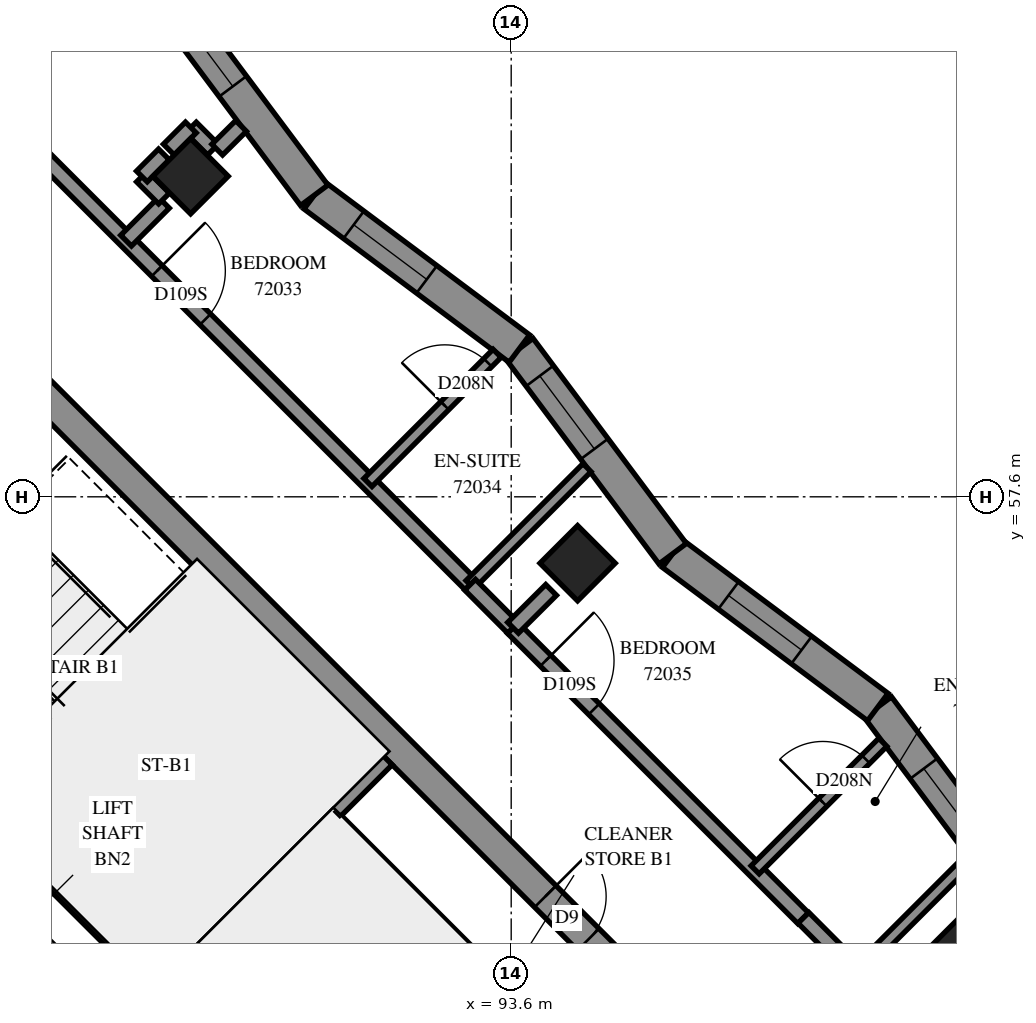
"""IFC4 building model, lengths in metres.
Left out: names, types, materials, properties, quantities, classifications, styles, units other than length and angle.
Written with IfcOpenShell. Run it as: python <this file> out.ifc"""

import sys

from ifc_helpers import new_model, si_unit, direction, frame, frame_2d, origin, origin_2d, place, context, subcontext, project, spatial, polyline, rectangle, outline, extrude, element, fill, save


model = new_model("IFC4")
c1 = context("Model", 3, precision=1e-05, world=origin(), true_north=direction((0.0, 1.0)))
c2 = subcontext(c1, "Body", "Model", "MODEL_VIEW")
j1 = project(units=[si_unit("LENGTHUNIT", "METRE"), si_unit("PLANEANGLEUNIT", "RADIAN")], contexts=[c1])
p1 = place(None, origin())
s1 = spatial("IfcSite", under=j1, at=p1, CompositionType="ELEMENT")
p2 = place(p1, origin())
s2 = spatial("IfcBuilding", under=s1, at=p2, CompositionType="ELEMENT")
p3 = place(p2, frame((0.0, 0.0, 264.2)))
s3 = spatial("IfcBuildingStorey", under=s2, at=p3, CompositionType="ELEMENT", Elevation=264.2)
for number, where, z_axis, x_axis in (
    (1, (89.382, 61.818, 0.0), (0.0, 0.0, 1.0), (0.707, -0.707, 0.0)),
    (2, (94.474, 56.727, 0.0), (0.0, 0.0, 1.0), (0.707, -0.707, 0.0)),
    (3, (99.565, 51.635, 0.0), (0.0, 0.0, 1.0), (0.707, -0.707, 0.0)),
):
    element("IfcColumn", number, at=place(p3, frame(where, z_axis=z_axis, x_axis=x_axis)), inside=s3, PredefinedType="COLUMN", context=c2, shape_type="SweptSolid", body=[
        extrude(rectangle(XDim=0.7, YDim=0.7, at=origin_2d()), origin(), (0.0, 0.0, 1.0), 3.1),
    ])
p4 = place(p3, frame((86.695, 59.696, -0.3), z_axis=(0.0, 0.0, 1.0), x_axis=(0.7071100706, -0.7071034917, 0.0)))
e4 = element("IfcWall", 4, at=p4, inside=s3, PredefinedType="SHEAR", context=c2, shape_type="SweptSolid", body=[
    extrude(rectangle(XDim=15.2, YDim=0.4, at=frame_2d((7.6, 0.0))), origin(), (0.0, 0.0, 1.0), 2.7),
])
p5 = place(p4, frame((10.4, 0.0, 0.3)))
e5 = element("IfcOpeningElement", 5, at=p5, cuts=e4, PredefinedType="OPENING", context=c2, shape_type="SweptSolid", body=[
    extrude(rectangle(XDim=0.8, YDim=2.1, at=frame_2d((0.4, 1.05))), frame((0.0, 0.21, 0.0), z_axis=(0.0, -1.0, 0.0), x_axis=(1.0, 0.0, 0.0)), (0.0, 0.0, 1.0), 0.42),
])
p6 = place(p3, frame((81.534, 53.969, 0.0), z_axis=(0.0, 0.0, 1.0), x_axis=(0.707103309, -0.7071102534, 0.0)))
e6 = element("IfcWall", 6, at=p6, inside=s3, PredefinedType="SOLIDWALL", context=c2, shape_type="SweptSolid", body=[
    extrude(rectangle(XDim=14.4, YDim=0.3, at=frame_2d((7.2, 0.0))), origin(), (0.0, 0.0, 1.0), 3.1),
])
p7 = place(p6, frame((8.55, 0.0, 0.0)))
e7 = element("IfcOpeningElement", 7, at=p7, cuts=e6, PredefinedType="OPENING", context=c2, shape_type="SweptSolid", body=[
    extrude(rectangle(XDim=0.9, YDim=2.1, at=frame_2d((0.45, 1.05))), frame((0.0, 0.16, 0.0), z_axis=(0.0, -1.0, 0.0), x_axis=(1.0, 0.0, 0.0)), (0.0, 0.0, 1.0), 0.32),
])
p8 = place(p6, frame((1.25, 0.0, 0.0)))
e8 = element("IfcOpeningElement", 8, at=p8, cuts=e6, PredefinedType="OPENING", context=c2, shape_type="SweptSolid", body=[
    extrude(rectangle(XDim=1.1, YDim=2.1, at=frame_2d((0.55, 1.05))), frame((0.0, 0.16, 0.0), z_axis=(0.0, -1.0, 0.0), x_axis=(1.0, 0.0, 0.0)), (0.0, 0.0, 1.0), 0.32),
])
p9 = place(p6, frame((4.85, 0.0, 0.0)))
e9 = element("IfcOpeningElement", 9, at=p9, cuts=e6, PredefinedType="OPENING", context=c2, shape_type="SweptSolid", body=[
    extrude(rectangle(XDim=1.1, YDim=2.1, at=frame_2d((0.55, 1.05))), frame((0.0, 0.16, 0.0), z_axis=(0.0, -1.0, 0.0), x_axis=(1.0, 0.0, 0.0)), (0.0, 0.0, 1.0), 0.32),
])
p10 = place(p6, frame((12.05, 0.0, 0.0)))
e10 = element("IfcOpeningElement", 10, at=p10, cuts=e6, PredefinedType="OPENING", context=c2, shape_type="SweptSolid", body=[
    extrude(rectangle(XDim=1.1, YDim=2.1, at=frame_2d((0.55, 1.05))), frame((0.0, 0.16, 0.0), z_axis=(0.0, -1.0, 0.0), x_axis=(1.0, 0.0, 0.0)), (0.0, 0.0, 1.0), 0.32),
])
p11 = place(p3, frame((83.867, 56.302, 0.0), z_axis=(0.0, 0.0, 1.0), x_axis=(0.7071137256, -0.7070998367, 0.0)))
e11 = element("IfcWall", 11, at=p11, inside=s3, PredefinedType="SOLIDWALL", context=c2, shape_type="SweptSolid", body=[
    extrude(rectangle(XDim=7.2, YDim=0.3, at=frame_2d((3.6, 0.0))), origin(), (0.0, 0.0, 1.0), 3.1),
])
p12 = place(p3, frame((88.958, 51.211, 0.0), z_axis=(0.0, 0.0, 1.0), x_axis=(0.7071067812, 0.7071067812, 0.0)))
e12 = element("IfcWall", 12, at=p12, inside=s3, PredefinedType="SOLIDWALL", context=c2, shape_type="SweptSolid", body=[
    extrude(rectangle(XDim=4.2, YDim=0.3, at=frame_2d((2.1, 0.0))), origin(), (0.0, 0.0, 1.0), 3.1),
])
p13 = place(p3, frame((100.452, 52.12, 0.0), z_axis=(0.0, 0.0, 1.0), x_axis=(-0.5986678127, 0.8009974095, 0.0)))
e13 = element("IfcWall", 13, at=p13, inside=s3, PredefinedType="SOLIDWALL", context=c2, shape_type="SweptSolid", body=[
    extrude(outline(polyline([(0.052, -0.225), (3.421, -0.225), (3.357, 0.225), (-0.052, 0.225), (0.052, -0.225)])), origin(), (0.0, 0.0, 1.0), 3.1),
])
p14 = place(p13, frame((1.178, 0.0, 0.45)))
e14 = element("IfcOpeningElement", 14, at=p14, cuts=e13, PredefinedType="OPENING", context=c2, shape_type="SweptSolid", body=[
    extrude(rectangle(XDim=1.2, YDim=2.55, at=frame_2d((0.6, 1.275))), frame((0.0, 0.235, 0.0), z_axis=(0.0, -1.0, 0.0), x_axis=(1.0, 0.0, 0.0)), (0.0, 0.0, 1.0), 0.47),
])
p15 = place(p3, frame((98.423, 54.834, 0.0), z_axis=(0.0, 0.0, 1.0), x_axis=(-0.8009997286, 0.5986647099, 0.0)))
e15 = element("IfcWall", 15, at=p15, inside=s3, PredefinedType="SOLIDWALL", context=c2, shape_type="SweptSolid", body=[
    extrude(outline(polyline([(-0.033, -0.225), (3.337, -0.225), (3.402, 0.225), (0.033, 0.225), (-0.033, -0.225)])), origin(), (0.0, 0.0, 1.0), 3.1),
])
p16 = place(p15, frame((1.253, 0.0, 0.45)))
e16 = element("IfcOpeningElement", 16, at=p16, cuts=e15, PredefinedType="OPENING", context=c2, shape_type="SweptSolid", body=[
    extrude(rectangle(XDim=1.2, YDim=2.55, at=frame_2d((0.6, 1.275))), frame((0.0, 0.235, 0.0), z_axis=(0.0, -1.0, 0.0), x_axis=(1.0, 0.0, 0.0)), (0.0, 0.0, 1.0), 0.47),
])
p17 = place(p3, frame((95.725, 56.851, 0.0), z_axis=(0.0, 0.0, 1.0), x_axis=(-0.5986837527, 0.8009854957, 0.0)))
e17 = element("IfcWall", 17, at=p17, inside=s3, PredefinedType="SOLIDWALL", context=c2, shape_type="SweptSolid", body=[
    extrude(outline(polyline([(0.033, -0.225), (3.402, -0.225), (3.337, 0.225), (-0.033, 0.225), (0.033, -0.225)])), origin(), (0.0, 0.0, 1.0), 3.1),
])
p18 = place(p17, frame((1.721, 0.0, 0.45)))
e18 = element("IfcOpeningElement", 18, at=p18, cuts=e17, PredefinedType="OPENING", context=c2, shape_type="SweptSolid", body=[
    extrude(rectangle(XDim=1.2, YDim=2.55, at=frame_2d((0.6, 1.275))), frame((0.0, 0.235, 0.0), z_axis=(0.0, -1.0, 0.0), x_axis=(1.0, 0.0, 0.0)), (0.0, 0.0, 1.0), 0.47),
])
p19 = place(p3, frame((93.707, 59.55, 0.0), z_axis=(0.0, 0.0, 1.0), x_axis=(-0.8009854957, 0.5986837527, 0.0)))
e19 = element("IfcWall", 19, at=p19, inside=s3, PredefinedType="SOLIDWALL", context=c2, shape_type="SweptSolid", body=[
    extrude(outline(polyline([(-0.033, -0.225), (3.337, -0.225), (3.402, 0.225), (0.033, 0.225), (-0.033, -0.225)])), origin(), (0.0, 0.0, 1.0), 3.1),
])
p20 = place(p19, frame((1.521, 0.0, 0.45)))
e20 = element("IfcOpeningElement", 20, at=p20, cuts=e19, PredefinedType="OPENING", context=c2, shape_type="SweptSolid", body=[
    extrude(rectangle(XDim=1.2, YDim=2.55, at=frame_2d((0.6, 1.275))), frame((0.0, 0.235, 0.0), z_axis=(0.0, -1.0, 0.0), x_axis=(1.0, 0.0, 0.0)), (0.0, 0.0, 1.0), 0.47),
])
p21 = place(p3, frame((91.009, 61.567, 0.0), z_axis=(0.0, 0.0, 1.0), x_axis=(-0.598678943, 0.8009890906, 0.0)))
e21 = element("IfcWall", 21, at=p21, inside=s3, PredefinedType="SOLIDWALL", context=c2, shape_type="SweptSolid", body=[
    extrude(outline(polyline([(0.033, -0.225), (3.402, -0.225), (3.337, 0.225), (-0.033, 0.225), (0.033, -0.225)])), origin(), (0.0, 0.0, 1.0), 3.1),
])
p22 = place(p21, frame((1.789, 0.0, 0.45)))
e22 = element("IfcOpeningElement", 22, at=p22, cuts=e21, PredefinedType="OPENING", context=c2, shape_type="SweptSolid", body=[
    extrude(rectangle(XDim=1.2, YDim=2.55, at=frame_2d((0.6, 1.275))), frame((0.0, 0.235, 0.0), z_axis=(0.0, -1.0, 0.0), x_axis=(1.0, 0.0, 0.0)), (0.0, 0.0, 1.0), 0.47),
])
p23 = place(p3, frame((91.313, 53.354, 0.0), z_axis=(0.0, 0.0, 1.0), x_axis=(0.7071067812, -0.7071067812, 0.0)))
e23 = element("IfcWall", 23, at=p23, inside=s3, PredefinedType="PARTITIONING", context=c2, shape_type="SweptSolid", body=[
    extrude(rectangle(XDim=5.95, YDim=0.15, at=frame_2d((2.975, 0.0))), origin(), (0.0, 0.0, 1.0), 3.1),
])
p24 = place(p3, frame((86.841, 62.669, 0.0), z_axis=(0.0, 0.0, 1.0), x_axis=(0.7071067812, -0.7071067812, 0.0)))
e24 = element("IfcWall", 24, at=p24, inside=s3, PredefinedType="PARTITIONING", context=c2, shape_type="SweptSolid", body=[
    extrude(rectangle(XDim=8.799, YDim=0.2, at=frame_2d((4.4, 0.0))), origin(), (0.0, 0.0, 1.0), 3.1),
])
p25 = place(p24, frame((2.967, 0.0, 0.0)))
e25 = element("IfcOpeningElement", 25, at=p25, cuts=e24, PredefinedType="OPENING", context=c2, shape_type="SweptSolid", body=[
    extrude(rectangle(XDim=0.9, YDim=2.1, at=frame_2d((0.45, 1.05))), frame((0.0, 0.11, 0.0), z_axis=(0.0, -1.0, 0.0), x_axis=(1.0, 0.0, 0.0)), (0.0, 0.0, 1.0), 0.22),
])
p26 = place(p3, frame((93.621, 55.875, 0.0), z_axis=(0.0, 0.0, 1.0), x_axis=(0.7071623255, -0.7070512325, 0.0)))
e26 = element("IfcWall", 26, at=p26, inside=s3, PredefinedType="PARTITIONING", context=c2, shape_type="SweptSolid", body=[
    extrude(rectangle(XDim=5.401, YDim=0.2, at=frame_2d((2.7, 0.0))), origin(), (0.0, 0.0, 1.0), 3.1),
])
p27 = place(p26, frame((0.611, 0.0, 0.0)))
e27 = element("IfcOpeningElement", 27, at=p27, cuts=e26, PredefinedType="OPENING", context=c2, shape_type="SweptSolid", body=[
    extrude(rectangle(XDim=0.9, YDim=2.1, at=frame_2d((0.45, 1.05))), frame((0.0, 0.11, 0.0), z_axis=(0.0, -1.0, 0.0), x_axis=(1.0, 0.0, 0.0)), (0.0, 0.0, 1.0), 0.22),
])
p28 = place(p3, frame((91.716, 57.788, 0.0), z_axis=(0.0, 0.0, 1.0), x_axis=(0.7071067812, 0.7071067812, 0.0)))
e28 = element("IfcWall", 28, at=p28, inside=s3, PredefinedType="PARTITIONING", context=c2, shape_type="SweptSolid", body=[
    extrude(rectangle(XDim=2.403, YDim=0.15, at=frame_2d((1.202, 0.0))), origin(), (0.0, 0.0, 1.0), 3.1),
])
p29 = place(p28, frame((1.43, 0.0, 0.0)))
e29 = element("IfcOpeningElement", 29, at=p29, cuts=e28, PredefinedType="OPENING", context=c2, shape_type="SweptSolid", body=[
    extrude(rectangle(XDim=0.8, YDim=2.1, at=frame_2d((0.4, 1.05))), frame((0.0, 0.085, 0.0), z_axis=(0.0, -1.0, 0.0), x_axis=(1.0, 0.0, 0.0)), (0.0, 0.0, 1.0), 0.17),
])
p30 = place(p3, frame((96.809, 52.693, 0.0), z_axis=(0.0, 0.0, 1.0), x_axis=(0.7075279036, 0.7066854079, 0.0)))
e30 = element("IfcWall", 30, at=p30, inside=s3, PredefinedType="PARTITIONING", context=c2, shape_type="SweptSolid", body=[
    extrude(rectangle(XDim=2.374, YDim=0.15, at=frame_2d((1.187, 0.0))), origin(), (0.0, 0.0, 1.0), 3.1),
])
p31 = place(p30, frame((1.258, 0.0, 0.0)))
e31 = element("IfcOpeningElement", 31, at=p31, cuts=e30, PredefinedType="OPENING", context=c2, shape_type="SweptSolid", body=[
    extrude(rectangle(XDim=0.8, YDim=2.1, at=frame_2d((0.4, 1.05))), frame((0.0, 0.085, 0.0), z_axis=(0.0, -1.0, 0.0), x_axis=(1.0, 0.0, 0.0)), (0.0, 0.0, 1.0), 0.17),
])
p32 = place(p3, frame((93.059, 56.445, 0.0), z_axis=(0.0, 0.0, 1.0), x_axis=(0.7071067812, 0.7071067812, 0.0)))
e32 = element("IfcWall", 32, at=p32, inside=s3, PredefinedType="PARTITIONING", context=c2, shape_type="SweptSolid", body=[
    extrude(rectangle(XDim=2.175, YDim=0.15, at=frame_2d((1.088, 0.0))), origin(), (0.0, 0.0, 1.0), 3.1),
])
p33 = place(p3, frame((98.149, 51.353, 0.0), z_axis=(0.0, 0.0, 1.0), x_axis=(0.7070829733, 0.7071305883, 0.0)))
e33 = element("IfcWall", 33, at=p33, inside=s3, PredefinedType="PARTITIONING", context=c2, shape_type="SweptSolid", body=[
    extrude(rectangle(XDim=2.1, YDim=0.15, at=frame_2d((1.05, 0.0))), origin(), (0.0, 0.0, 1.0), 3.1),
])
p34 = place(p3, frame((97.445, 52.061, 0.0), z_axis=(0.0, 0.0, 1.0), x_axis=(0.7059292536, -0.7082823511, 0.0)))
e34 = element("IfcWall", 34, at=p34, inside=s3, PredefinedType="PARTITIONING", context=c2, shape_type="SweptSolid", body=[
    extrude(rectangle(XDim=0.85, YDim=0.2, at=frame_2d((0.425, 0.0))), origin(), (0.0, 0.0, 1.0), 3.1),
])
p35 = place(p3, frame((93.059, 56.443, 0.0), z_axis=(0.0, 0.0, 1.0), x_axis=(0.7058541592, -0.7083571881, 0.0)))
e35 = element("IfcWall", 35, at=p35, inside=s3, PredefinedType="PARTITIONING", context=c2, shape_type="SweptSolid", body=[
    extrude(rectangle(XDim=0.799, YDim=0.2, at=frame_2d((0.4, 0.0))), origin(), (0.0, 0.0, 1.0), 3.1),
])
p36 = place(p3, frame((93.625, 55.877, 0.0), z_axis=(0.0, 0.0, 1.0), x_axis=(0.7085224061, 0.7056883165, 0.0)))
e36 = element("IfcWall", 36, at=p36, inside=s3, PredefinedType="PARTITIONING", context=c2, shape_type="SweptSolid", body=[
    extrude(rectangle(XDim=0.706, YDim=0.2, at=frame_2d((0.353, 0.0))), origin(), (0.0, 0.0, 1.0), 3.1),
])
p37 = place(p3, frame((88.534, 60.971, 0.0), z_axis=(0.0, 0.0, 1.0), x_axis=(0.7071067812, 0.7071067812, 0.0)))
e37 = element("IfcWall", 37, at=p37, inside=s3, PredefinedType="PARTITIONING", context=c2, shape_type="SweptSolid", body=[
    extrude(rectangle(XDim=0.704, YDim=0.2, at=frame_2d((0.352, 0.0))), origin(), (0.0, 0.0, 1.0), 3.1),
])
for number, where, z_axis, x_axis in (
    (38, (88.743, 61.815, 0.0), (0.0, 0.0, 1.0), (0.707, -0.707, 0.0)),
    (39, (89.386, 62.458, 0.0), (0.0, 0.0, 1.0), (0.707, -0.707, 0.0)),
    (40, (88.741, 61.815, 0.0), (0.0, 0.0, 1.0), (0.707, 0.707, 0.0)),
    (41, (89.095, 62.169, 0.0), (0.0, 0.0, 1.0), (0.707, 0.707, 0.0)),
):
    element("IfcWall", number, at=place(p3, frame(where, z_axis=z_axis, x_axis=x_axis)), inside=s3, PredefinedType="PARTITIONING", context=c2, shape_type="SweptSolid", body=[
        extrude(rectangle(XDim=0.41, YDim=0.2, at=frame_2d((0.205, 0.0))), origin(), (0.0, 0.0, 1.0), 3.1),
    ])
p38 = place(p3, frame((89.733, 62.167, 0.0), z_axis=(0.0, 0.0, 1.0), x_axis=(0.7098168379, 0.7043862979, 0.0)))
e42 = element("IfcWall", 42, at=p38, inside=s3, PredefinedType="PARTITIONING", context=c2, shape_type="SweptSolid", body=[
    extrude(rectangle(XDim=0.442, YDim=0.2, at=frame_2d((0.221, 0.0))), origin(), (0.0, 0.0, 1.0), 3.1),
])
p39 = place(p14, origin())
e43 = element("IfcWindow", 43, at=p39, inside=s3, PartitioningType="SINGLE_PANEL", PredefinedType="WINDOW", context=c2, shape_type="SweptSolid", body=[
    extrude(rectangle(XDim=1.2, YDim=2.55, at=frame_2d((0.6, 1.275))), frame((0.0, 0.205, 0.0), z_axis=(0.0, -1.0, 0.0), x_axis=(1.0, 0.0, 0.0)), (0.0, 0.0, 1.0), 0.06),
])
fill(e14, e43)
p40 = place(p16, origin())
e44 = element("IfcWindow", 44, at=p40, inside=s3, PartitioningType="SINGLE_PANEL", PredefinedType="WINDOW", context=c2, shape_type="SweptSolid", body=[
    extrude(rectangle(XDim=1.2, YDim=2.55, at=frame_2d((0.6, 1.275))), frame((0.0, 0.205, 0.0), z_axis=(0.0, -1.0, 0.0), x_axis=(1.0, 0.0, 0.0)), (0.0, 0.0, 1.0), 0.06),
])
fill(e16, e44)
p41 = place(p18, origin())
e45 = element("IfcWindow", 45, at=p41, inside=s3, PartitioningType="SINGLE_PANEL", PredefinedType="WINDOW", context=c2, shape_type="SweptSolid", body=[
    extrude(rectangle(XDim=1.2, YDim=2.55, at=frame_2d((0.6, 1.275))), frame((0.0, 0.205, 0.0), z_axis=(0.0, -1.0, 0.0), x_axis=(1.0, 0.0, 0.0)), (0.0, 0.0, 1.0), 0.06),
])
fill(e18, e45)
p42 = place(p20, origin())
e46 = element("IfcWindow", 46, at=p42, inside=s3, PartitioningType="SINGLE_PANEL", PredefinedType="WINDOW", context=c2, shape_type="SweptSolid", body=[
    extrude(rectangle(XDim=1.2, YDim=2.55, at=frame_2d((0.6, 1.275))), frame((0.0, 0.205, 0.0), z_axis=(0.0, -1.0, 0.0), x_axis=(1.0, 0.0, 0.0)), (0.0, 0.0, 1.0), 0.06),
])
fill(e20, e46)
p43 = place(p22, origin())
e47 = element("IfcWindow", 47, at=p43, inside=s3, PartitioningType="SINGLE_PANEL", PredefinedType="WINDOW", context=c2, shape_type="SweptSolid", body=[
    extrude(rectangle(XDim=1.2, YDim=2.55, at=frame_2d((0.6, 1.275))), frame((0.0, 0.205, 0.0), z_axis=(0.0, -1.0, 0.0), x_axis=(1.0, 0.0, 0.0)), (0.0, 0.0, 1.0), 0.06),
])
fill(e22, e47)
p44 = place(p5, origin())
e48 = element("IfcDoor", 48, at=p44, inside=s3, OperationType="SINGLE_SWING_RIGHT", PredefinedType="DOOR", context=c2, shape_type="SweptSolid", body=[
    extrude(rectangle(XDim=0.8, YDim=2.1, at=frame_2d((0.4, 1.05))), frame((0.0, 0.025, 0.0), z_axis=(0.0, -1.0, 0.0), x_axis=(1.0, 0.0, 0.0)), (0.0, 0.0, 1.0), 0.05),
])
fill(e5, e48)
p45 = place(p25, origin())
e49 = element("IfcDoor", 49, at=p45, inside=s3, OperationType="SINGLE_SWING_LEFT", PredefinedType="DOOR", context=c2, shape_type="SweptSolid", body=[
    extrude(rectangle(XDim=0.9, YDim=2.1, at=frame_2d((0.45, 1.05))), frame((0.0, 0.025, 0.0), z_axis=(0.0, -1.0, 0.0), x_axis=(1.0, 0.0, 0.0)), (0.0, 0.0, 1.0), 0.05),
])
fill(e25, e49)
p46 = place(p29, origin())
e50 = element("IfcDoor", 50, at=p46, inside=s3, OperationType="SINGLE_SWING_RIGHT", PredefinedType="DOOR", context=c2, shape_type="SweptSolid", body=[
    extrude(rectangle(XDim=0.8, YDim=2.1, at=frame_2d((0.4, 1.05))), frame((0.0, 0.025, 0.0), z_axis=(0.0, -1.0, 0.0), x_axis=(1.0, 0.0, 0.0)), (0.0, 0.0, 1.0), 0.05),
])
fill(e29, e50)
p47 = place(p27, origin())
e51 = element("IfcDoor", 51, at=p47, inside=s3, OperationType="SINGLE_SWING_LEFT", PredefinedType="DOOR", context=c2, shape_type="SweptSolid", body=[
    extrude(rectangle(XDim=0.9, YDim=2.1, at=frame_2d((0.45, 1.05))), frame((0.0, 0.025, 0.0), z_axis=(0.0, -1.0, 0.0), x_axis=(1.0, 0.0, 0.0)), (0.0, 0.0, 1.0), 0.05),
])
fill(e27, e51)
p48 = place(p31, origin())
e52 = element("IfcDoor", 52, at=p48, inside=s3, OperationType="SINGLE_SWING_RIGHT", PredefinedType="DOOR", context=c2, shape_type="SweptSolid", body=[
    extrude(rectangle(XDim=0.8, YDim=2.1, at=frame_2d((0.4, 1.05))), frame((0.0, 0.025, 0.0), z_axis=(0.0, -1.0, 0.0), x_axis=(1.0, 0.0, 0.0)), (0.0, 0.0, 1.0), 0.05),
])
fill(e31, e52)
save(model, sys.argv[1])
